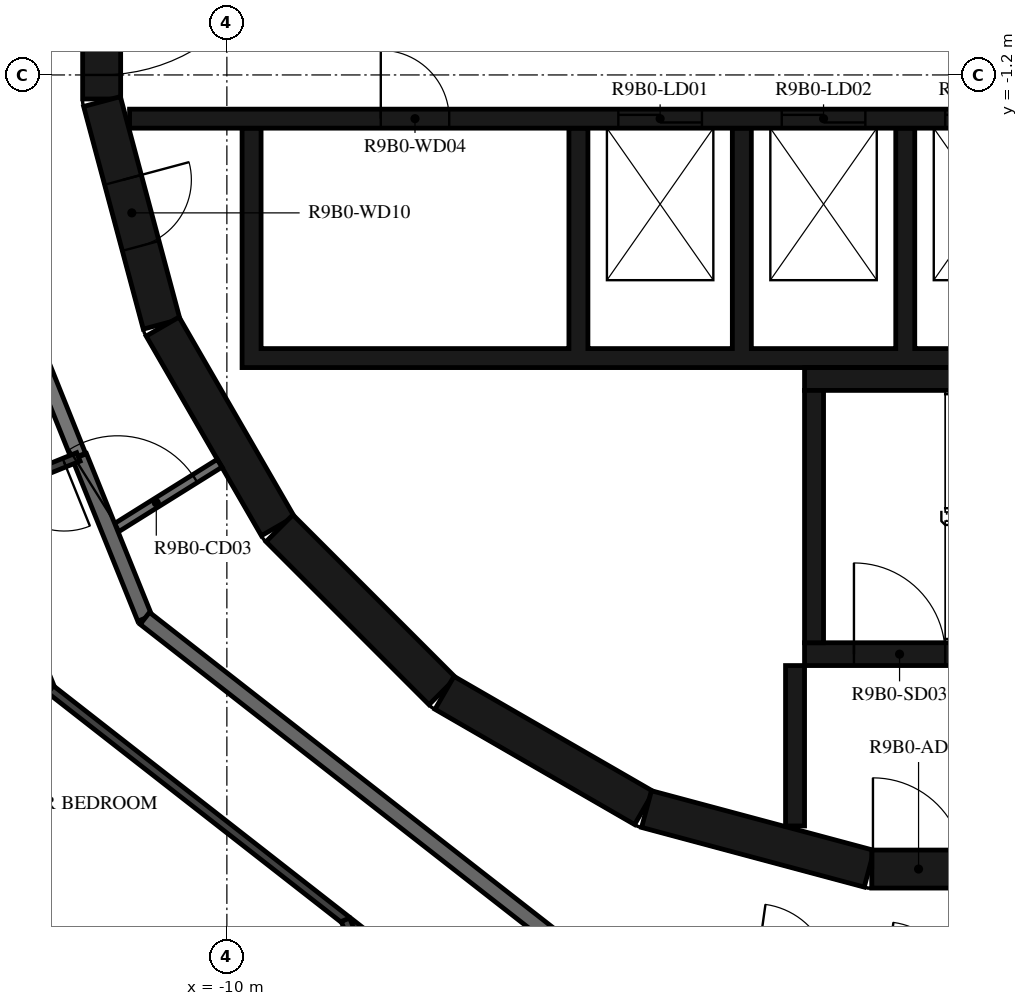
"""IFC4 building model, lengths in metres.
Left out: names, types, materials, properties, quantities, classifications, styles, units other than length and angle.
Written with IfcOpenShell. Run it as: python <this file> out.ifc"""

import sys

from ifc_helpers import new_model, si_unit, direction, frame, frame_2d, origin, place, context, subcontext, project, spatial, polyline, rectangle, outline, extrude, element, fill, save


model = new_model("IFC4")
c1 = context("Model", 3, precision=1e-05, world=origin(), true_north=direction((0.0, 1.0)))
c2 = subcontext(c1, "Body", "Model", "MODEL_VIEW")
j1 = project(units=[si_unit("LENGTHUNIT", "METRE"), si_unit("PLANEANGLEUNIT", "RADIAN")], contexts=[c1])
p1 = place(None, origin())
s1 = spatial("IfcSite", under=j1, at=p1, CompositionType="ELEMENT")
p2 = place(p1, origin())
s2 = spatial("IfcBuilding", under=s1, at=p2, CompositionType="ELEMENT")
p3 = place(p2, frame((0.0, 0.0, 347.0)))
s3 = spatial("IfcBuildingStorey", under=s2, at=p3, CompositionType="ELEMENT", Elevation=347.0)
p4 = place(p3, frame((-11.647, 1.516, 0.0), z_axis=(0.0, 0.0, 1.0), x_axis=(0.0, -1.0, 0.0)))
e1 = element("IfcWall", 1, at=p4, inside=s3, PredefinedType="SHEAR", context=c2, shape_type="SweptSolid", body=[
    extrude(rectangle(XDim=3.033, YDim=0.5, at=frame_2d((1.516, 0.0))), origin(), (0.0, 0.0, 1.0), 3.12),
])
p5 = place(p4, frame((0.316, 0.0, 0.0)))
e2 = element("IfcOpeningElement", 2, at=p5, cuts=e1, PredefinedType="OPENING", context=c2, shape_type="SweptSolid", body=[
    extrude(rectangle(XDim=2.4, YDim=2.1, at=frame_2d((1.2, 1.05))), frame((0.0, 0.26, 0.0), z_axis=(0.0, -1.0, 0.0), x_axis=(1.0, 0.0, 0.0)), (0.0, 0.0, 1.0), 0.52),
])
p6 = place(p3, frame((-11.643, -1.55, 0.0), z_axis=(0.0, 0.0, 1.0), x_axis=(0.258734743916, -0.965948410781, 0.0)))
e3 = element("IfcWall", 3, at=p6, inside=s3, PredefinedType="SHEAR", context=c2, shape_type="SweptSolid", body=[
    extrude(rectangle(XDim=3.033, YDim=0.5, at=frame_2d((1.516, 0.0))), origin(), (0.0, 0.0, 1.0), 3.12),
])
p7 = place(p6, frame((1.066, 0.0, 0.0)))
e4 = element("IfcOpeningElement", 4, at=p7, cuts=e3, PredefinedType="OPENING", context=c2, shape_type="SweptSolid", body=[
    extrude(rectangle(XDim=0.9, YDim=2.1, at=frame_2d((0.45, 1.05))), frame((0.0, 0.26, 0.0), z_axis=(0.0, -1.0, 0.0), x_axis=(1.0, 0.0, 0.0)), (0.0, 0.0, 1.0), 0.52),
])
p8 = place(p3, frame((-10.845, -4.51, 0.0), z_axis=(0.0, 0.0, 1.0), x_axis=(0.500087131594, -0.865975092491, 0.0)))
e5 = element("IfcWall", 5, at=p8, inside=s3, PredefinedType="SHEAR", context=c2, shape_type="SweptSolid", body=[
    extrude(rectangle(XDim=3.033, YDim=0.5, at=frame_2d((1.516, 0.0))), origin(), (0.0, 0.0, 1.0), 3.12),
])
p9 = place(p3, frame((-9.308, -7.164, 0.0), z_axis=(0.0, 0.0, 1.0), x_axis=(0.707106781187, -0.707106781187, 0.0)))
e6 = element("IfcWall", 6, at=p9, inside=s3, PredefinedType="SHEAR", context=c2, shape_type="SweptSolid", body=[
    extrude(rectangle(XDim=3.032, YDim=0.5, at=frame_2d((1.516, 0.0))), origin(), (0.0, 0.0, 1.0), 3.12),
])
for number, where, z_axis, x_axis in (
    (7, (-7.137, -9.329, 0.0), (0.0, 0.0, 1.0), (0.866, -0.5, 0.0)),
    (8, (-4.479, -10.858, 0.0), (0.0, 0.0, 1.0), (0.966, -0.259, 0.0)),
):
    element("IfcWall", number, at=place(p3, frame(where, z_axis=z_axis, x_axis=x_axis)), inside=s3, PredefinedType="SHEAR", context=c2, shape_type="SweptSolid", body=[
        extrude(rectangle(XDim=3.033, YDim=0.5, at=frame_2d((1.516, 0.0))), origin(), (0.0, 0.0, 1.0), 3.12),
    ])
p10 = place(p3, frame((-1.516, -11.647, 0.0), z_axis=(0.0, 0.0, 1.0), x_axis=(1.0, 0.0, 0.0)))
e9 = element("IfcWall", 9, at=p10, inside=s3, PredefinedType="SHEAR", context=c2, shape_type="SweptSolid", body=[
    extrude(rectangle(XDim=3.033, YDim=0.5, at=frame_2d((1.516, 0.0))), origin(), (0.0, 0.0, 1.0), 3.12),
])
p11 = place(p10, frame((0.016, 0.0, 0.0)))
e10 = element("IfcOpeningElement", 10, at=p11, cuts=e9, PredefinedType="OPENING", context=c2, shape_type="SweptSolid", body=[
    extrude(rectangle(XDim=1.2, YDim=2.1, at=frame_2d((0.6, 1.05))), frame((0.0, 0.26, 0.0), z_axis=(0.0, -1.0, 0.0), x_axis=(1.0, 0.0, 0.0)), (0.0, 0.0, 1.0), 0.52),
])
p12 = place(p3, frame((-2.275, -8.67, 0.0), z_axis=(0.0, 0.0, 1.0), x_axis=(0.0, 1.0, 0.0)))
e11 = element("IfcWall", 11, at=p12, inside=s3, PredefinedType="SHEAR", context=c2, shape_type="SweptSolid", body=[
    extrude(rectangle(XDim=3.32, YDim=0.25, at=frame_2d((1.66, 0.0))), origin(), (0.0, 0.0, 1.0), 3.12),
])
p13 = place(p3, frame((-2.4, -5.2, 0.0), z_axis=(0.0, 0.0, 1.0), x_axis=(1.0, 0.0, 0.0)))
e12 = element("IfcWall", 12, at=p13, inside=s3, PredefinedType="SHEAR", context=c2, shape_type="SweptSolid", body=[
    extrude(rectangle(XDim=7.05, YDim=0.3, at=frame_2d((3.525, 0.0))), origin(), (0.0, 0.0, 1.0), 3.12),
])
p14 = place(p3, frame((-2.4, -8.82, 0.0), z_axis=(0.0, 0.0, 1.0), x_axis=(1.0, 0.0, 0.0)))
e13 = element("IfcWall", 13, at=p14, inside=s3, PredefinedType="SHEAR", context=c2, shape_type="SweptSolid", body=[
    extrude(rectangle(XDim=2.5, YDim=0.3, at=frame_2d((1.25, 0.0))), origin(), (0.0, 0.0, 1.0), 3.12),
])
p15 = place(p14, frame((0.65, 0.0, 0.0)))
e14 = element("IfcOpeningElement", 14, at=p15, cuts=e13, PredefinedType="OPENING", context=c2, shape_type="SweptSolid", body=[
    extrude(rectangle(XDim=1.2, YDim=2.1, at=frame_2d((0.6, 1.05))), frame((0.0, 0.16, 0.0), z_axis=(0.0, -1.0, 0.0), x_axis=(1.0, 0.0, 0.0)), (0.0, 0.0, 1.0), 0.32),
])
p16 = place(p3, frame((-2.525, -8.97, 0.0), z_axis=(0.0, 0.0, 1.0), x_axis=(0.0, -1.0, 0.0)))
e15 = element("IfcWall", 15, at=p16, inside=s3, PredefinedType="SHEAR", context=c2, shape_type="SweptSolid", body=[
    extrude(rectangle(XDim=2.11, YDim=0.25, at=frame_2d((1.055, 0.0))), origin(), (0.0, 0.0, 1.0), 3.12),
])
p17 = place(p3, origin())
e16 = element("IfcWall", 16, at=p17, inside=s3, PredefinedType="SHEAR", context=c2, shape_type="SweptSolid", body=[
    extrude(outline(polyline([(9.8, -5.05), (9.8, -4.8), (9.8, -1.9), (9.55, -1.9), (9.55, -4.8), (7.65, -4.8), (7.65, -1.9), (7.4, -1.9), (7.4, -4.8), (5.5, -4.8), (5.5, -1.9), (5.25, -1.9), (5.25, -4.8), (3.35, -4.8), (3.35, -1.9), (3.1, -1.9), (3.1, -4.8), (1.2, -4.8), (1.2, -1.9), (0.95, -1.9), (0.95, -4.8), (-0.95, -4.8), (-0.95, -1.9), (-1.2, -1.9), (-1.2, -4.8), (-3.1, -4.8), (-3.1, -1.9), (-3.35, -1.9), (-3.35, -4.8), (-5.25, -4.8), (-5.25, -1.9), (-5.5, -1.9), (-5.5, -4.8), (-9.55, -4.8), (-9.55, -1.9), (-9.8, -1.9), (-9.8, -4.8), (-9.8, -5.05), (9.8, -5.05)])), origin(), (0.0, 0.0, 1.0), 3.12),
])
p18 = place(p3, frame((-11.28, -1.775, 0.0), z_axis=(0.0, 0.0, 1.0), x_axis=(1.0, 0.0, 0.0)))
e17 = element("IfcWall", 17, at=p18, inside=s3, PredefinedType="SHEAR", context=c2, shape_type="SweptSolid", body=[
    extrude(rectangle(XDim=14.38, YDim=0.25, at=frame_2d((7.19, 0.0))), origin(), (0.0, 0.0, 1.0), 3.12),
])
p19 = place(p18, frame((6.43, 0.0, 0.0)))
e18 = element("IfcOpeningElement", 18, at=p19, cuts=e17, PredefinedType="OPENING", context=c2, shape_type="SweptSolid", body=[
    extrude(rectangle(XDim=1.1, YDim=2.1, at=frame_2d((0.55, 1.05))), frame((0.0, 0.135, 0.0), z_axis=(0.0, -1.0, 0.0), x_axis=(1.0, 0.0, 0.0)), (0.0, 0.0, 1.0), 0.27),
])
p20 = place(p18, frame((8.58, 0.0, 0.0)))
e19 = element("IfcOpeningElement", 19, at=p20, cuts=e17, PredefinedType="OPENING", context=c2, shape_type="SweptSolid", body=[
    extrude(rectangle(XDim=1.1, YDim=2.1, at=frame_2d((0.55, 1.05))), frame((0.0, 0.135, 0.0), z_axis=(0.0, -1.0, 0.0), x_axis=(1.0, 0.0, 0.0)), (0.0, 0.0, 1.0), 0.27),
])
p21 = place(p18, frame((10.73, 0.0, 0.0)))
e20 = element("IfcOpeningElement", 20, at=p21, cuts=e17, PredefinedType="OPENING", context=c2, shape_type="SweptSolid", body=[
    extrude(rectangle(XDim=1.1, YDim=2.1, at=frame_2d((0.55, 1.05))), frame((0.0, 0.135, 0.0), z_axis=(0.0, -1.0, 0.0), x_axis=(1.0, 0.0, 0.0)), (0.0, 0.0, 1.0), 0.27),
])
p22 = place(p18, frame((3.305, 0.0, 0.0)))
e21 = element("IfcOpeningElement", 21, at=p22, cuts=e17, PredefinedType="OPENING", context=c2, shape_type="SweptSolid", body=[
    extrude(rectangle(XDim=0.9, YDim=2.1, at=frame_2d((0.45, 1.05))), frame((0.0, 0.135, 0.0), z_axis=(0.0, -1.0, 0.0), x_axis=(1.0, 0.0, 0.0)), (0.0, 0.0, 1.0), 0.27),
])
p23 = place(p18, frame((12.98, 0.0, 0.0)))
e22 = element("IfcOpeningElement", 22, at=p23, cuts=e17, PredefinedType="OPENING", context=c2, shape_type="SweptSolid", body=[
    extrude(rectangle(XDim=0.9, YDim=2.1, at=frame_2d((0.45, 1.05))), frame((0.0, 0.135, 0.0), z_axis=(0.0, -1.0, 0.0), x_axis=(1.0, 0.0, 0.0)), (0.0, 0.0, 1.0), 0.27),
])
p24 = place(p3, frame((-11.539, -7.21, 0.0), z_axis=(0.0, 0.0, 1.0), x_axis=(0.848103039868, 0.529831325769, 0.0)))
e23 = element("IfcWall", 23, at=p24, inside=s3, PredefinedType="PARTITIONING", context=c2, shape_type="SweptSolid", body=[
    extrude(rectangle(XDim=1.702, YDim=0.12, at=frame_2d((0.851, 0.0))), origin(), (0.0, 0.0, 1.0), 3.12),
])
p25 = place(p24, frame((0.12, 0.0, 0.0)))
e24 = element("IfcOpeningElement", 24, at=p25, cuts=e23, PredefinedType="OPENING", context=c2, shape_type="SweptSolid", body=[
    extrude(rectangle(XDim=1.2, YDim=2.1, at=frame_2d((0.6, 1.05))), frame((0.0, 0.07, 0.0), z_axis=(0.0, -1.0, 0.0), x_axis=(1.0, 0.0, 0.0)), (0.0, 0.0, 1.0), 0.14),
])
p26 = place(p3, frame((-13.769, -1.691, 0.0), z_axis=(0.0, 0.0, 1.0), x_axis=(0.372720094028, -0.927943819155, 0.0)))
e25 = element("IfcWall", 25, at=p26, inside=s3, PredefinedType="STANDARD", context=c2, shape_type="SweptSolid", body=[
    extrude(rectangle(XDim=4.875, YDim=0.2, at=frame_2d((2.438, 0.0))), origin(), (0.0, 0.0, 1.0), 3.12),
])
p27 = place(p3, frame((-11.939, -6.22, 0.0), z_axis=(0.0, 0.0, 1.0), x_axis=(0.374651128394, -0.927165860024, 0.0)))
e26 = element("IfcWall", 26, at=p27, inside=s3, PredefinedType="STANDARD", context=c2, shape_type="SweptSolid", body=[
    extrude(rectangle(XDim=2.296, YDim=0.2, at=frame_2d((1.148, 0.0))), origin(), (0.0, 0.0, 1.0), 3.12),
])
p28 = place(p3, frame((-11.079, -8.349, 0.0), z_axis=(0.0, 0.0, 1.0), x_axis=(0.78800478687, -0.615669112324, 0.0)))
e27 = element("IfcWall", 27, at=p28, inside=s3, PredefinedType="STANDARD", context=c2, shape_type="SweptSolid", body=[
    extrude(rectangle(XDim=7.181, YDim=0.2, at=frame_2d((3.591, 0.0))), origin(), (0.0, 0.0, 1.0), 3.12),
])
p29 = place(p3, frame((-11.953, -6.225, 0.0), z_axis=(0.0, 0.0, 1.0), x_axis=(-0.927144096717, -0.374704982518, 0.0)))
e28 = element("IfcWall", 28, at=p29, inside=s3, PredefinedType="PARTITIONING", context=c2, shape_type="SweptSolid", body=[
    extrude(rectangle(XDim=1.485, YDim=0.12, at=frame_2d((0.742, 0.0))), origin(), (0.0, 0.0, 1.0), 3.12),
])
p30 = place(p29, frame((0.2, 0.0, 0.0)))
e29 = element("IfcOpeningElement", 29, at=p30, cuts=e28, PredefinedType="OPENING", context=c2, shape_type="SweptSolid", body=[
    extrude(rectangle(XDim=0.9, YDim=2.1, at=frame_2d((0.45, 1.05))), frame((0.0, 0.07, 0.0), z_axis=(0.0, -1.0, 0.0), x_axis=(1.0, 0.0, 0.0)), (0.0, 0.0, 1.0), 0.14),
])
p31 = place(p3, frame((-13.33, -6.782, 0.0), z_axis=(0.0, 0.0, 1.0), x_axis=(0.374602180132, -0.927185637637, 0.0)))
e30 = element("IfcWall", 30, at=p31, inside=s3, PredefinedType="PARTITIONING", context=c2, shape_type="SweptSolid", body=[
    extrude(rectangle(XDim=2.698, YDim=0.12, at=frame_2d((1.349, 0.0))), origin(), (0.0, 0.0, 1.0), 3.12),
])
p32 = place(p3, frame((-12.319, -9.283, 0.0), z_axis=(0.0, 0.0, 1.0), x_axis=(0.788000268464, -0.61567489546, 0.0)))
e31 = element("IfcWall", 31, at=p32, inside=s3, PredefinedType="PARTITIONING", context=c2, shape_type="SweptSolid", body=[
    extrude(rectangle(XDim=7.985, YDim=0.12, at=frame_2d((3.992, 0.0))), origin(), (0.0, 0.0, 1.0), 3.12),
])
p33 = place(p32, frame((6.423, 0.0, 0.0)))
e32 = element("IfcOpeningElement", 32, at=p33, cuts=e31, PredefinedType="OPENING", context=c2, shape_type="SweptSolid", body=[
    extrude(rectangle(XDim=0.9, YDim=2.1, at=frame_2d((0.45, 1.05))), frame((0.0, 0.07, 0.0), z_axis=(0.0, -1.0, 0.0), x_axis=(1.0, 0.0, 0.0)), (0.0, 0.0, 1.0), 0.14),
])
p34 = place(p3, frame((-5.894, -18.616, 0.0), z_axis=(0.0, 0.0, 1.0), x_axis=(-0.374596683143, 0.927187858515, 0.0)))
e33 = element("IfcWall", 33, at=p34, inside=s3, PredefinedType="PARTITIONING", context=c2, shape_type="SweptSolid", body=[
    extrude(rectangle(XDim=6.796, YDim=0.12, at=frame_2d((3.398, 0.0))), origin(), (0.0, 0.0, 1.0), 3.12),
])
p35 = place(p34, frame((2.822, 0.0, 0.0)))
e34 = element("IfcOpeningElement", 34, at=p35, cuts=e33, PredefinedType="OPENING", context=c2, shape_type="SweptSolid", body=[
    extrude(rectangle(XDim=0.9, YDim=2.1, at=frame_2d((0.45, 1.05))), frame((0.0, 0.07, 0.0), z_axis=(0.0, -1.0, 0.0), x_axis=(1.0, 0.0, 0.0)), (0.0, 0.0, 1.0), 0.14),
])
p36 = place(p15, origin())
e35 = element("IfcDoor", 35, at=p36, inside=s3, OperationType="SINGLE_SWING_LEFT", PredefinedType="DOOR", context=c2, shape_type="SweptSolid", body=[
    extrude(rectangle(XDim=1.2, YDim=2.1, at=frame_2d((0.6, 1.05))), frame((0.0, 0.025, 0.0), z_axis=(0.0, -1.0, 0.0), x_axis=(1.0, 0.0, 0.0)), (0.0, 0.0, 1.0), 0.05),
])
fill(e14, e35)
p37 = place(p11, origin())
e36 = element("IfcDoor", 36, at=p37, inside=s3, OperationType="SINGLE_SWING_RIGHT", PredefinedType="DOOR", context=c2, shape_type="SweptSolid", body=[
    extrude(rectangle(XDim=1.2, YDim=2.1, at=frame_2d((0.6, 1.05))), frame((0.0, 0.025, 0.0), z_axis=(0.0, -1.0, 0.0), x_axis=(1.0, 0.0, 0.0)), (0.0, 0.0, 1.0), 0.05),
])
fill(e10, e36)
p38 = place(p5, origin())
e37 = element("IfcDoor", 37, at=p38, inside=s3, OperationType="DOUBLE_DOOR_SINGLE_SWING", PredefinedType="DOOR", context=c2, shape_type="SweptSolid", body=[
    extrude(rectangle(XDim=2.4, YDim=2.1, at=frame_2d((1.2, 1.05))), frame((0.0, 0.025, 0.0), z_axis=(0.0, -1.0, 0.0), x_axis=(1.0, 0.0, 0.0)), (0.0, 0.0, 1.0), 0.05),
])
fill(e2, e37)
p39 = place(p19, origin())
e38 = element("IfcDoor", 38, at=p39, inside=s3, OperationType="DOUBLE_DOOR_SLIDING", PredefinedType="DOOR", context=c2, shape_type="SweptSolid", body=[
    extrude(rectangle(XDim=1.1, YDim=2.1, at=frame_2d((0.55, 1.05))), frame((0.0, 0.025, 0.0), z_axis=(0.0, -1.0, 0.0), x_axis=(1.0, 0.0, 0.0)), (0.0, 0.0, 1.0), 0.05),
])
fill(e18, e38)
p40 = place(p20, origin())
e39 = element("IfcDoor", 39, at=p40, inside=s3, OperationType="DOUBLE_DOOR_SLIDING", PredefinedType="DOOR", context=c2, shape_type="SweptSolid", body=[
    extrude(rectangle(XDim=1.1, YDim=2.1, at=frame_2d((0.55, 1.05))), frame((0.0, 0.025, 0.0), z_axis=(0.0, -1.0, 0.0), x_axis=(1.0, 0.0, 0.0)), (0.0, 0.0, 1.0), 0.05),
])
fill(e19, e39)
p41 = place(p21, origin())
e40 = element("IfcDoor", 40, at=p41, inside=s3, OperationType="DOUBLE_DOOR_SLIDING", PredefinedType="DOOR", context=c2, shape_type="SweptSolid", body=[
    extrude(rectangle(XDim=1.1, YDim=2.1, at=frame_2d((0.55, 1.05))), frame((0.0, 0.025, 0.0), z_axis=(0.0, -1.0, 0.0), x_axis=(1.0, 0.0, 0.0)), (0.0, 0.0, 1.0), 0.05),
])
fill(e20, e40)
p42 = place(p22, origin())
e41 = element("IfcDoor", 41, at=p42, inside=s3, OperationType="SINGLE_SWING_RIGHT", PredefinedType="DOOR", context=c2, shape_type="SweptSolid", body=[
    extrude(rectangle(XDim=0.9, YDim=2.1, at=frame_2d((0.45, 1.05))), frame((0.0, 0.025, 0.0), z_axis=(0.0, -1.0, 0.0), x_axis=(1.0, 0.0, 0.0)), (0.0, 0.0, 1.0), 0.05),
])
fill(e21, e41)
p43 = place(p7, origin())
e42 = element("IfcDoor", 42, at=p43, inside=s3, OperationType="SINGLE_SWING_RIGHT", PredefinedType="DOOR", context=c2, shape_type="SweptSolid", body=[
    extrude(rectangle(XDim=0.9, YDim=2.1, at=frame_2d((0.45, 1.05))), frame((0.0, 0.025, 0.0), z_axis=(0.0, -1.0, 0.0), x_axis=(1.0, 0.0, 0.0)), (0.0, 0.0, 1.0), 0.05),
])
fill(e4, e42)
p44 = place(p30, origin())
e43 = element("IfcDoor", 43, at=p44, inside=s3, OperationType="SINGLE_SWING_LEFT", PredefinedType="DOOR", context=c2, shape_type="SweptSolid", body=[
    extrude(rectangle(XDim=0.9, YDim=2.1, at=frame_2d((0.45, 1.05))), frame((0.0, 0.025, 0.0), z_axis=(0.0, -1.0, 0.0), x_axis=(1.0, 0.0, 0.0)), (0.0, 0.0, 1.0), 0.05),
])
fill(e29, e43)
p45 = place(p25, origin())
e44 = element("IfcDoor", 44, at=p45, inside=s3, OperationType="DOUBLE_DOOR_SINGLE_SWING", PredefinedType="DOOR", context=c2, shape_type="SweptSolid", body=[
    extrude(rectangle(XDim=1.2, YDim=2.1, at=frame_2d((0.6, 1.05))), frame((0.0, 0.025, 0.0), z_axis=(0.0, -1.0, 0.0), x_axis=(1.0, 0.0, 0.0)), (0.0, 0.0, 1.0), 0.05),
])
fill(e24, e44)
save(model, sys.argv[1])
